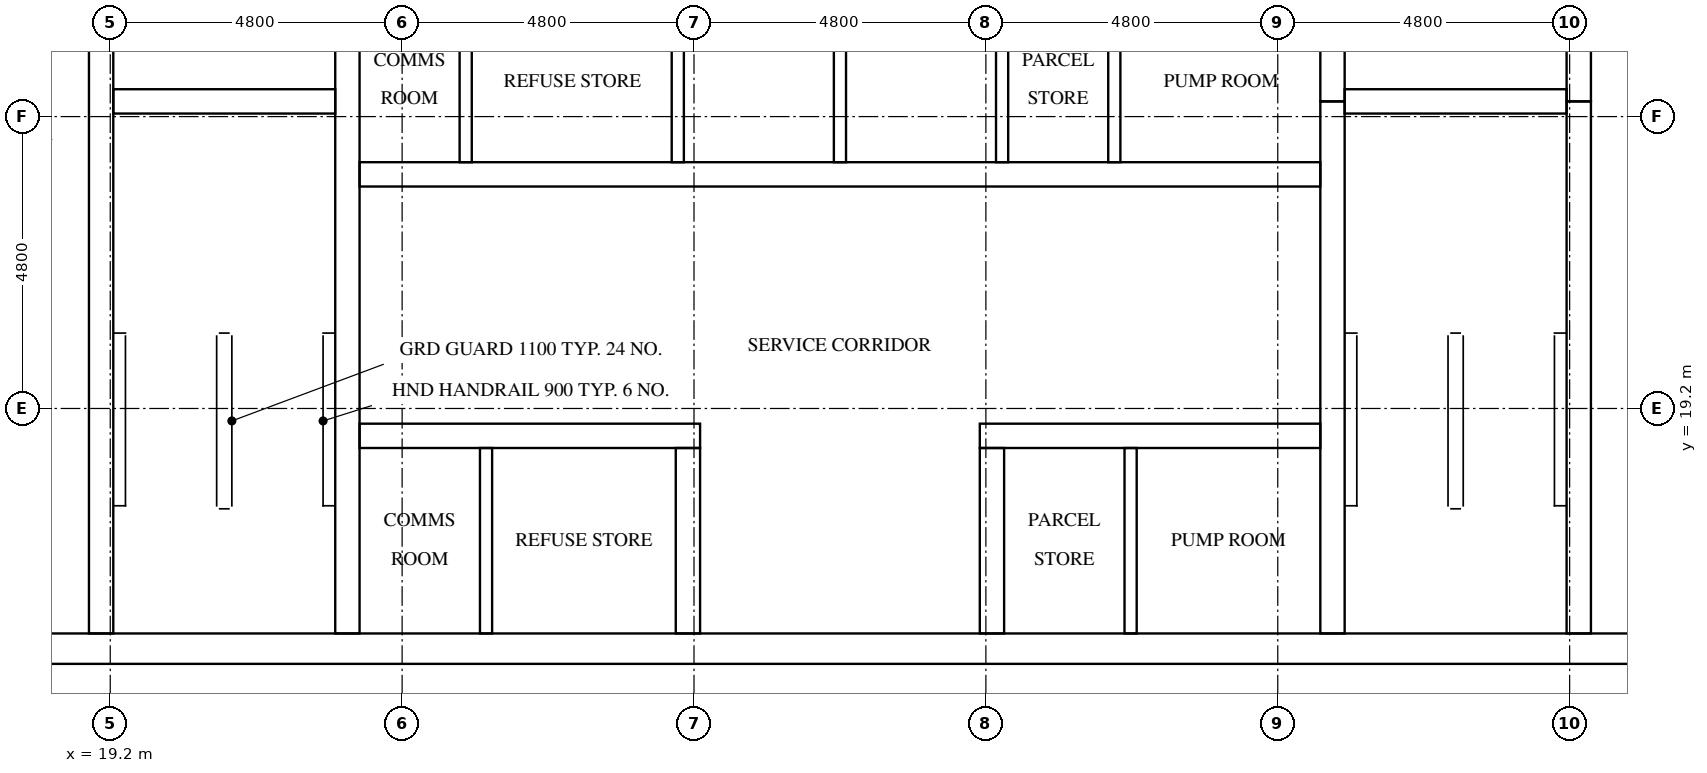
"""IFC4 building model, lengths in metres.
Left out: names, types, materials, properties, quantities, classifications, styles, units other than length and angle.
Written with IfcOpenShell. Run it as: python <this file> out.ifc"""

import sys

from ifc_helpers import new_model, si_unit, direction, frame, frame_2d, origin, place, context, subcontext, project, spatial, rectangle, extrude, element, fill, save


model = new_model("IFC4")
c1 = context("Model", 3, precision=1e-05, world=origin(), true_north=direction((0.0, 1.0)))
c2 = subcontext(c1, "Body", "Model", "MODEL_VIEW")
j1 = project(units=[si_unit("LENGTHUNIT", "METRE"), si_unit("PLANEANGLEUNIT", "RADIAN")], contexts=[c1])
p1 = place(None, origin())
s1 = spatial("IfcSite", under=j1, at=p1, CompositionType="ELEMENT")
p2 = place(p1, origin())
s2 = spatial("IfcBuilding", under=s1, at=p2, CompositionType="ELEMENT")
p3 = place(p2, frame((0.0, 0.0, 279.1)))
s3 = spatial("IfcBuildingStorey", under=s2, at=p3, CompositionType="ELEMENT", Elevation=279.1)
p4 = place(p3, frame((15.0, 15.25, 0.0), z_axis=(0.0, 0.0, 1.0), x_axis=(1.0, 0.0, 0.0)))
e1 = element("IfcWall", 1, at=p4, inside=s3, PredefinedType="SHEAR", context=c2, shape_type="SweptSolid", body=[
    extrude(rectangle(XDim=32.4, YDim=0.5, at=frame_2d((16.2, 0.0))), origin(), (0.0, 0.0, 1.0), 3.2),
])
p5 = place(p4, frame((15.3, 0.0, 0.0)))
e2 = element("IfcOpeningElement", 2, at=p5, cuts=e1, PredefinedType="OPENING", context=c2, shape_type="SweptSolid", body=[
    extrude(rectangle(XDim=1.8, YDim=2.1, at=frame_2d((0.9, 1.05))), frame((0.0, 0.26, 0.0), z_axis=(0.0, -1.0, 0.0), x_axis=(1.0, 0.0, 0.0)), (0.0, 0.0, 1.0), 0.52),
])
p6 = place(p3, frame((19.05, 15.5, 0.0), z_axis=(0.0, 0.0, 1.0), x_axis=(0.0, 1.0, 0.0)))
e3 = element("IfcWall", 3, at=p6, inside=s3, PredefinedType="SHEAR", context=c2, shape_type="SweptSolid", body=[
    extrude(rectangle(XDim=15.55, YDim=0.4, at=frame_2d((7.775, 0.0))), origin(), (0.0, 0.0, 1.0), 3.2),
])
p7 = place(p6, frame((9.95, 0.0, 0.0)))
e4 = element("IfcOpeningElement", 4, at=p7, cuts=e3, PredefinedType="OPENING", context=c2, shape_type="SweptSolid", body=[
    extrude(rectangle(XDim=1.1, YDim=2.1, at=frame_2d((0.55, 1.05))), frame((0.0, 0.21, 0.0), z_axis=(0.0, -1.0, 0.0), x_axis=(1.0, 0.0, 0.0)), (0.0, 0.0, 1.0), 0.42),
])
p8 = place(p6, frame((13.45, 0.0, 0.0)))
e5 = element("IfcOpeningElement", 5, at=p8, cuts=e3, PredefinedType="OPENING", context=c2, shape_type="SweptSolid", body=[
    extrude(rectangle(XDim=1.1, YDim=2.1, at=frame_2d((0.55, 1.05))), frame((0.0, 0.21, 0.0), z_axis=(0.0, -1.0, 0.0), x_axis=(1.0, 0.0, 0.0)), (0.0, 0.0, 1.0), 0.42),
])
p9 = place(p6, frame((0.7, 0.0, 0.0)))
e6 = element("IfcOpeningElement", 6, at=p9, cuts=e3, PredefinedType="OPENING", context=c2, shape_type="SweptSolid", body=[
    extrude(rectangle(XDim=1.2, YDim=2.1, at=frame_2d((0.6, 1.05))), frame((0.0, 0.21, 0.0), z_axis=(0.0, -1.0, 0.0), x_axis=(1.0, 0.0, 0.0)), (0.0, 0.0, 1.0), 0.42),
])
p10 = place(p3, frame((23.1, 15.5, 0.0), z_axis=(0.0, 0.0, 1.0), x_axis=(0.0, 1.0, 0.0)))
e7 = element("IfcWall", 7, at=p10, inside=s3, PredefinedType="SHEAR", context=c2, shape_type="SweptSolid", body=[
    extrude(rectangle(XDim=21.8, YDim=0.4, at=frame_2d((10.9, 0.0))), origin(), (0.0, 0.0, 1.0), 3.2),
])
p11 = place(p3, frame((39.3, 15.5, 0.0), z_axis=(0.0, 0.0, 1.0), x_axis=(0.0, 1.0, 0.0)))
e8 = element("IfcWall", 8, at=p11, inside=s3, PredefinedType="SHEAR", context=c2, shape_type="SweptSolid", body=[
    extrude(rectangle(XDim=8.75, YDim=0.4, at=frame_2d((4.375, 0.0))), origin(), (0.0, 0.0, 1.0), 3.2),
])
p12 = place(p3, frame((39.3, 24.25, 0.0), z_axis=(0.0, 0.0, 1.0), x_axis=(0.0, 1.0, 0.0)))
e9 = element("IfcWall", 9, at=p12, inside=s3, PredefinedType="SHEAR", context=c2, shape_type="SweptSolid", body=[
    extrude(rectangle(XDim=3.5, YDim=0.4, at=frame_2d((1.75, 0.0))), origin(), (0.0, 0.0, 1.0), 3.2),
])
p13 = place(p3, frame((43.35, 15.5, 0.0), z_axis=(0.0, 0.0, 1.0), x_axis=(0.0, 1.0, 0.0)))
e10 = element("IfcWall", 10, at=p13, inside=s3, PredefinedType="SHEAR", context=c2, shape_type="SweptSolid", body=[
    extrude(rectangle(XDim=8.75, YDim=0.4, at=frame_2d((4.375, 0.0))), origin(), (0.0, 0.0, 1.0), 3.2),
])
p14 = place(p13, frame((0.7, 0.0, 0.0)))
e11 = element("IfcOpeningElement", 11, at=p14, cuts=e10, PredefinedType="OPENING", context=c2, shape_type="SweptSolid", body=[
    extrude(rectangle(XDim=1.2, YDim=2.1, at=frame_2d((0.6, 1.05))), frame((0.0, 0.21, 0.0), z_axis=(0.0, -1.0, 0.0), x_axis=(1.0, 0.0, 0.0)), (0.0, 0.0, 1.0), 0.42),
])
p15 = place(p3, frame((43.35, 24.25, 0.0), z_axis=(0.0, 0.0, 1.0), x_axis=(0.0, 1.0, 0.0)))
e12 = element("IfcWall", 12, at=p15, inside=s3, PredefinedType="SHEAR", context=c2, shape_type="SweptSolid", body=[
    extrude(rectangle(XDim=3.5, YDim=0.4, at=frame_2d((1.75, 0.0))), origin(), (0.0, 0.0, 1.0), 3.2),
])
p16 = place(p15, frame((1.2, 0.0, 0.0)))
e13 = element("IfcOpeningElement", 13, at=p16, cuts=e12, PredefinedType="OPENING", context=c2, shape_type="SweptSolid", body=[
    extrude(rectangle(XDim=1.1, YDim=2.1, at=frame_2d((0.55, 1.05))), frame((0.0, 0.21, 0.0), z_axis=(0.0, -1.0, 0.0), x_axis=(1.0, 0.0, 0.0)), (0.0, 0.0, 1.0), 0.42),
])
for number, where, z_axis, x_axis in (
    (14, (19.25, 24.25, 0.0), (0.0, 0.0, 1.0), (1.0, 0.0, 0.0)),
    (15, (39.5, 24.25, 0.0), (0.0, 0.0, 1.0), (1.0, 0.0, 0.0)),
):
    element("IfcWall", number, at=place(p3, frame(where, z_axis=z_axis, x_axis=x_axis)), inside=s3, PredefinedType="SHEAR", context=c2, shape_type="SweptSolid", body=[
        extrude(rectangle(XDim=3.65, YDim=0.4, at=frame_2d((1.825, 0.0))), origin(), (0.0, 0.0, 1.0), 3.2),
    ])
p17 = place(p3, frame((23.3, 18.75, 0.0), z_axis=(0.0, 0.0, 1.0), x_axis=(1.0, 0.0, 0.0)))
e16 = element("IfcWall", 16, at=p17, inside=s3, PredefinedType="SHEAR", context=c2, shape_type="SweptSolid", body=[
    extrude(rectangle(XDim=5.6, YDim=0.4, at=frame_2d((2.8, 0.0))), origin(), (0.0, 0.0, 1.0), 3.2),
])
p18 = place(p17, frame((0.49, 0.0, 0.0)))
e17 = element("IfcOpeningElement", 17, at=p18, cuts=e16, PredefinedType="OPENING", context=c2, shape_type="SweptSolid", body=[
    extrude(rectangle(XDim=1.0, YDim=2.1, at=frame_2d((0.5, 1.05))), frame((0.0, 0.21, 0.0), z_axis=(0.0, -1.0, 0.0), x_axis=(1.0, 0.0, 0.0)), (0.0, 0.0, 1.0), 0.42),
])
p19 = place(p17, frame((3.19, 0.0, 0.0)))
e18 = element("IfcOpeningElement", 18, at=p19, cuts=e16, PredefinedType="OPENING", context=c2, shape_type="SweptSolid", body=[
    extrude(rectangle(XDim=1.0, YDim=2.1, at=frame_2d((0.5, 1.05))), frame((0.0, 0.21, 0.0), z_axis=(0.0, -1.0, 0.0), x_axis=(1.0, 0.0, 0.0)), (0.0, 0.0, 1.0), 0.42),
])
p20 = place(p3, frame((33.5, 18.75, 0.0), z_axis=(0.0, 0.0, 1.0), x_axis=(1.0, 0.0, 0.0)))
e19 = element("IfcWall", 19, at=p20, inside=s3, PredefinedType="SHEAR", context=c2, shape_type="SweptSolid", body=[
    extrude(rectangle(XDim=5.6, YDim=0.4, at=frame_2d((2.8, 0.0))), origin(), (0.0, 0.0, 1.0), 3.2),
])
p21 = place(p20, frame((0.89, 0.0, 0.0)))
e20 = element("IfcOpeningElement", 20, at=p21, cuts=e19, PredefinedType="OPENING", context=c2, shape_type="SweptSolid", body=[
    extrude(rectangle(XDim=1.0, YDim=2.1, at=frame_2d((0.5, 1.05))), frame((0.0, 0.21, 0.0), z_axis=(0.0, -1.0, 0.0), x_axis=(1.0, 0.0, 0.0)), (0.0, 0.0, 1.0), 0.42),
])
p22 = place(p20, frame((3.59, 0.0, 0.0)))
e21 = element("IfcOpeningElement", 21, at=p22, cuts=e19, PredefinedType="OPENING", context=c2, shape_type="SweptSolid", body=[
    extrude(rectangle(XDim=1.0, YDim=2.1, at=frame_2d((0.5, 1.05))), frame((0.0, 0.21, 0.0), z_axis=(0.0, -1.0, 0.0), x_axis=(1.0, 0.0, 0.0)), (0.0, 0.0, 1.0), 0.42),
])
p23 = place(p3, frame((23.3, 23.05, 0.0), z_axis=(0.0, 0.0, 1.0), x_axis=(1.0, 0.0, 0.0)))
e22 = element("IfcWall", 22, at=p23, inside=s3, PredefinedType="SHEAR", context=c2, shape_type="SweptSolid", body=[
    extrude(rectangle(XDim=15.8, YDim=0.4, at=frame_2d((7.9, 0.0))), origin(), (0.0, 0.0, 1.0), 3.2),
])
p24 = place(p23, frame((0.323, 0.0, 0.0)))
e23 = element("IfcOpeningElement", 23, at=p24, cuts=e22, PredefinedType="OPENING", context=c2, shape_type="SweptSolid", body=[
    extrude(rectangle(XDim=1.0, YDim=2.1, at=frame_2d((0.5, 1.05))), frame((0.0, 0.21, 0.0), z_axis=(0.0, -1.0, 0.0), x_axis=(1.0, 0.0, 0.0)), (0.0, 0.0, 1.0), 0.42),
])
p25 = place(p23, frame((2.989, 0.0, 0.0)))
e24 = element("IfcOpeningElement", 24, at=p25, cuts=e22, PredefinedType="OPENING", context=c2, shape_type="SweptSolid", body=[
    extrude(rectangle(XDim=1.0, YDim=2.1, at=frame_2d((0.5, 1.05))), frame((0.0, 0.21, 0.0), z_axis=(0.0, -1.0, 0.0), x_axis=(1.0, 0.0, 0.0)), (0.0, 0.0, 1.0), 0.42),
])
p26 = place(p23, frame((10.989, 0.0, 0.0)))
e25 = element("IfcOpeningElement", 25, at=p26, cuts=e22, PredefinedType="OPENING", context=c2, shape_type="SweptSolid", body=[
    extrude(rectangle(XDim=1.0, YDim=2.1, at=frame_2d((0.5, 1.05))), frame((0.0, 0.21, 0.0), z_axis=(0.0, -1.0, 0.0), x_axis=(1.0, 0.0, 0.0)), (0.0, 0.0, 1.0), 0.42),
])
p27 = place(p23, frame((13.656, 0.0, 0.0)))
e26 = element("IfcOpeningElement", 26, at=p27, cuts=e22, PredefinedType="OPENING", context=c2, shape_type="SweptSolid", body=[
    extrude(rectangle(XDim=1.0, YDim=2.1, at=frame_2d((0.5, 1.05))), frame((0.0, 0.21, 0.0), z_axis=(0.0, -1.0, 0.0), x_axis=(1.0, 0.0, 0.0)), (0.0, 0.0, 1.0), 0.42),
])
for number, where, z_axis, x_axis in (
    (27, (28.7, 15.5, 0.0), (0.0, 0.0, 1.0), (0.0, 1.0, 0.0)),
    (28, (33.7, 15.5, 0.0), (0.0, 0.0, 1.0), (0.0, 1.0, 0.0)),
):
    element("IfcWall", number, at=place(p3, frame(where, z_axis=z_axis, x_axis=x_axis)), inside=s3, PredefinedType="SHEAR", context=c2, shape_type="SweptSolid", body=[
        extrude(rectangle(XDim=3.05, YDim=0.4, at=frame_2d((1.525, 0.0))), origin(), (0.0, 0.0, 1.0), 3.2),
    ])
for number, where, z_axis, x_axis in (
    (29, (28.533, 23.25, 0.0), (0.0, 0.0, 1.0), (0.0, 1.0, 0.0)),
    (30, (31.2, 23.25, 0.0), (0.0, 0.0, 1.0), (0.0, 1.0, 0.0)),
    (31, (33.867, 23.25, 0.0), (0.0, 0.0, 1.0), (0.0, 1.0, 0.0)),
):
    element("IfcWall", number, at=place(p3, frame(where, z_axis=z_axis, x_axis=x_axis)), inside=s3, PredefinedType="SOLIDWALL", context=c2, shape_type="SweptSolid", body=[
        extrude(rectangle(XDim=2.7, YDim=0.2, at=frame_2d((1.35, 0.0))), origin(), (0.0, 0.0, 1.0), 3.2),
    ])
for number, where, z_axis, x_axis in (
    (32, (25.045, 23.25, 0.0), (0.0, 0.0, 1.0), (0.0, 1.0, 0.0)),
    (33, (35.712, 23.25, 0.0), (0.0, 0.0, 1.0), (0.0, 1.0, 0.0)),
):
    element("IfcWall", number, at=place(p3, frame(where, z_axis=z_axis, x_axis=x_axis)), inside=s3, PredefinedType="PARTITIONING", context=c2, shape_type="SweptSolid", body=[
        extrude(rectangle(XDim=2.7, YDim=0.2, at=frame_2d((1.35, 0.0))), origin(), (0.0, 0.0, 1.0), 3.2),
    ])
for number, where, z_axis, x_axis in (
    (34, (25.38, 15.5, 0.0), (0.0, 0.0, 1.0), (0.0, 1.0, 0.0)),
    (35, (35.98, 15.5, 0.0), (0.0, 0.0, 1.0), (0.0, 1.0, 0.0)),
):
    element("IfcWall", number, at=place(p3, frame(where, z_axis=z_axis, x_axis=x_axis)), inside=s3, PredefinedType="PARTITIONING", context=c2, shape_type="SweptSolid", body=[
        extrude(rectangle(XDim=3.05, YDim=0.2, at=frame_2d((1.525, 0.0))), origin(), (0.0, 0.0, 1.0), 3.2),
    ])
p28 = place(p9, frame((1.2, 0.0, 0.0), z_axis=(0.0, 0.0, 1.0), x_axis=(-1.0, 0.0, 0.0)))
e36 = element("IfcDoor", 36, at=p28, inside=s3, OperationType="SINGLE_SWING_LEFT", PredefinedType="DOOR", context=c2, shape_type="SweptSolid", body=[
    extrude(rectangle(XDim=1.2, YDim=2.1, at=frame_2d((0.6, 1.05))), frame((0.0, 0.025, 0.0), z_axis=(0.0, -1.0, 0.0), x_axis=(1.0, 0.0, 0.0)), (0.0, 0.0, 1.0), 0.05),
])
fill(e6, e36)
p29 = place(p14, origin())
e37 = element("IfcDoor", 37, at=p29, inside=s3, OperationType="SINGLE_SWING_RIGHT", PredefinedType="DOOR", context=c2, shape_type="SweptSolid", body=[
    extrude(rectangle(XDim=1.2, YDim=2.1, at=frame_2d((0.6, 1.05))), frame((0.0, 0.025, 0.0), z_axis=(0.0, -1.0, 0.0), x_axis=(1.0, 0.0, 0.0)), (0.0, 0.0, 1.0), 0.05),
])
fill(e11, e37)
p30 = place(p5, frame((1.8, 0.0, 0.0), z_axis=(0.0, 0.0, 1.0), x_axis=(-1.0, 0.0, 0.0)))
e38 = element("IfcDoor", 38, at=p30, inside=s3, OperationType="DOUBLE_DOOR_SINGLE_SWING", PredefinedType="DOOR", context=c2, shape_type="SweptSolid", body=[
    extrude(rectangle(XDim=1.8, YDim=2.1, at=frame_2d((0.9, 1.05))), frame((0.0, 0.025, 0.0), z_axis=(0.0, -1.0, 0.0), x_axis=(1.0, 0.0, 0.0)), (0.0, 0.0, 1.0), 0.05),
])
fill(e2, e38)
p31 = place(p24, frame((1.0, 0.0, 0.0), z_axis=(0.0, 0.0, 1.0), x_axis=(-1.0, 0.0, 0.0)))
e39 = element("IfcDoor", 39, at=p31, inside=s3, OperationType="SINGLE_SWING_RIGHT", PredefinedType="DOOR", context=c2, shape_type="SweptSolid", body=[
    extrude(rectangle(XDim=1.0, YDim=2.1, at=frame_2d((0.5, 1.05))), frame((0.0, 0.025, 0.0), z_axis=(0.0, -1.0, 0.0), x_axis=(1.0, 0.0, 0.0)), (0.0, 0.0, 1.0), 0.05),
])
fill(e23, e39)
p32 = place(p25, frame((1.0, 0.0, 0.0), z_axis=(0.0, 0.0, 1.0), x_axis=(-1.0, 0.0, 0.0)))
e40 = element("IfcDoor", 40, at=p32, inside=s3, OperationType="SINGLE_SWING_LEFT", PredefinedType="DOOR", context=c2, shape_type="SweptSolid", body=[
    extrude(rectangle(XDim=1.0, YDim=2.1, at=frame_2d((0.5, 1.05))), frame((0.0, 0.025, 0.0), z_axis=(0.0, -1.0, 0.0), x_axis=(1.0, 0.0, 0.0)), (0.0, 0.0, 1.0), 0.05),
])
fill(e24, e40)
p33 = place(p26, frame((1.0, 0.0, 0.0), z_axis=(0.0, 0.0, 1.0), x_axis=(-1.0, 0.0, 0.0)))
e41 = element("IfcDoor", 41, at=p33, inside=s3, OperationType="SINGLE_SWING_RIGHT", PredefinedType="DOOR", context=c2, shape_type="SweptSolid", body=[
    extrude(rectangle(XDim=1.0, YDim=2.1, at=frame_2d((0.5, 1.05))), frame((0.0, 0.025, 0.0), z_axis=(0.0, -1.0, 0.0), x_axis=(1.0, 0.0, 0.0)), (0.0, 0.0, 1.0), 0.05),
])
fill(e25, e41)
p34 = place(p27, frame((1.0, 0.0, 0.0), z_axis=(0.0, 0.0, 1.0), x_axis=(-1.0, 0.0, 0.0)))
e42 = element("IfcDoor", 42, at=p34, inside=s3, OperationType="SINGLE_SWING_LEFT", PredefinedType="DOOR", context=c2, shape_type="SweptSolid", body=[
    extrude(rectangle(XDim=1.0, YDim=2.1, at=frame_2d((0.5, 1.05))), frame((0.0, 0.025, 0.0), z_axis=(0.0, -1.0, 0.0), x_axis=(1.0, 0.0, 0.0)), (0.0, 0.0, 1.0), 0.05),
])
fill(e26, e42)
p35 = place(p18, origin())
e43 = element("IfcDoor", 43, at=p35, inside=s3, OperationType="SINGLE_SWING_RIGHT", PredefinedType="DOOR", context=c2, shape_type="SweptSolid", body=[
    extrude(rectangle(XDim=1.0, YDim=2.1, at=frame_2d((0.5, 1.05))), frame((0.0, 0.025, 0.0), z_axis=(0.0, -1.0, 0.0), x_axis=(1.0, 0.0, 0.0)), (0.0, 0.0, 1.0), 0.05),
])
fill(e17, e43)
p36 = place(p19, origin())
e44 = element("IfcDoor", 44, at=p36, inside=s3, OperationType="SINGLE_SWING_LEFT", PredefinedType="DOOR", context=c2, shape_type="SweptSolid", body=[
    extrude(rectangle(XDim=1.0, YDim=2.1, at=frame_2d((0.5, 1.05))), frame((0.0, 0.025, 0.0), z_axis=(0.0, -1.0, 0.0), x_axis=(1.0, 0.0, 0.0)), (0.0, 0.0, 1.0), 0.05),
])
fill(e18, e44)
p37 = place(p21, origin())
e45 = element("IfcDoor", 45, at=p37, inside=s3, OperationType="SINGLE_SWING_RIGHT", PredefinedType="DOOR", context=c2, shape_type="SweptSolid", body=[
    extrude(rectangle(XDim=1.0, YDim=2.1, at=frame_2d((0.5, 1.05))), frame((0.0, 0.025, 0.0), z_axis=(0.0, -1.0, 0.0), x_axis=(1.0, 0.0, 0.0)), (0.0, 0.0, 1.0), 0.05),
])
fill(e20, e45)
p38 = place(p22, origin())
e46 = element("IfcDoor", 46, at=p38, inside=s3, OperationType="SINGLE_SWING_LEFT", PredefinedType="DOOR", context=c2, shape_type="SweptSolid", body=[
    extrude(rectangle(XDim=1.0, YDim=2.1, at=frame_2d((0.5, 1.05))), frame((0.0, 0.025, 0.0), z_axis=(0.0, -1.0, 0.0), x_axis=(1.0, 0.0, 0.0)), (0.0, 0.0, 1.0), 0.05),
])
fill(e21, e46)
save(model, sys.argv[1])
